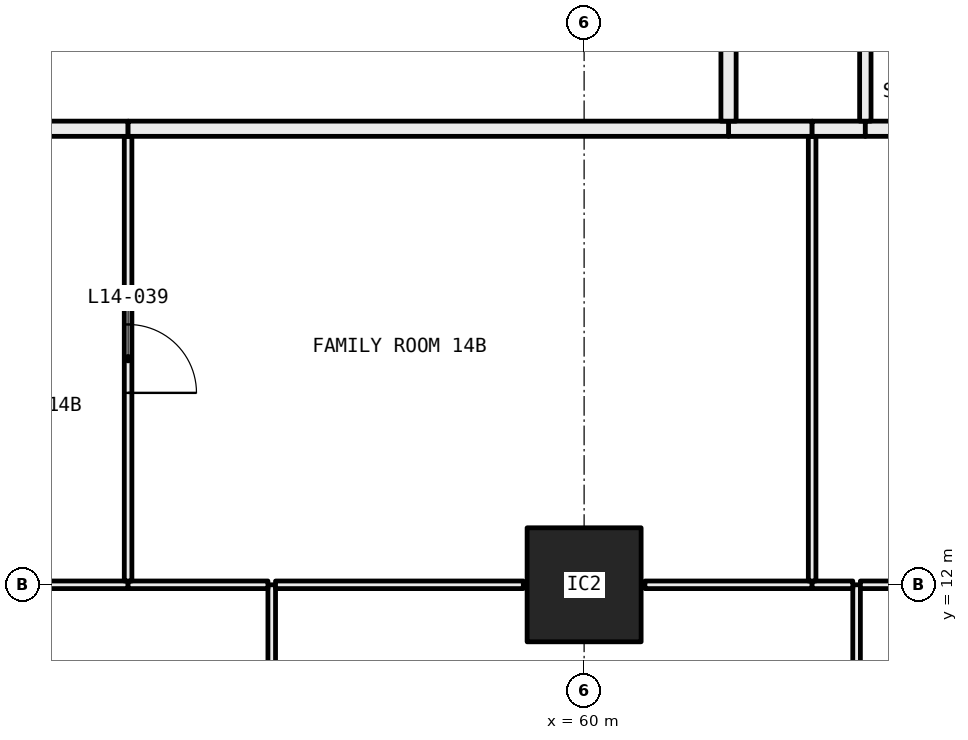
"""IFC4 building model, lengths in metres.
Left out: names, types, materials, properties, quantities, classifications, styles, units other than length and angle.
Written with IfcOpenShell. Run it as: python <this file> out.ifc"""

import sys

from ifc_helpers import new_model, si_unit, direction, frame, frame_2d, origin, origin_2d, place, context, subcontext, project, spatial, rectangle, hollow_rectangle, extrude, element, fill, save


model = new_model("IFC4")
c1 = context("Model", 3, precision=1e-05, world=origin(), true_north=direction((0.0, 1.0)))
c2 = subcontext(c1, "Body", "Model", "MODEL_VIEW")
j1 = project(units=[si_unit("LENGTHUNIT", "METRE"), si_unit("PLANEANGLEUNIT", "RADIAN")], contexts=[c1])
p1 = place(None, origin())
s1 = spatial("IfcSite", under=j1, at=p1, CompositionType="ELEMENT")
p2 = place(p1, origin())
s2 = spatial("IfcBuilding", under=s1, at=p2, CompositionType="ELEMENT")
p3 = place(p2, frame((0.0, 0.0, 61.05)))
s3 = spatial("IfcBuildingStorey", under=s2, at=p3, CompositionType="ELEMENT", Elevation=61.05)
p4 = place(p3, frame((60.0, 12.0, 0.0), z_axis=(0.0, 0.0, 1.0), x_axis=(1.0, 0.0, 0.0)))
e1 = element("IfcColumn", 1, at=p4, inside=s3, PredefinedType="COLUMN", context=c2, shape_type="SweptSolid", body=[
    extrude(hollow_rectangle(XDim=1.5, YDim=1.5, WallThickness=0.065, at=origin_2d()), origin(), (0.0, 0.0, 1.0), 3.05),
])
p5 = place(p3, frame((55.89, 6.05, 0.0), z_axis=(0.0, 0.0, 1.0), x_axis=(0.0, 1.0, 0.0)))
e2 = element("IfcWall", 2, at=p5, inside=s3, PredefinedType="PARTITIONING", context=c2, shape_type="SweptSolid", body=[
    extrude(rectangle(XDim=5.95, YDim=0.1, at=frame_2d((2.975, 0.0))), origin(), (0.0, 0.0, 1.0), 2.45),
])
p6 = place(p5, frame((2.525, 0.0, 0.0)))
e3 = element("IfcOpeningElement", 3, at=p6, cuts=e2, PredefinedType="OPENING", context=c2, shape_type="SweptSolid", body=[
    extrude(rectangle(XDim=0.9, YDim=2.1, at=frame_2d((0.45, 1.05))), frame((0.0, 0.06, 0.0), z_axis=(0.0, -1.0, 0.0), x_axis=(1.0, 0.0, 0.0)), (0.0, 0.0, 1.0), 0.12),
])
p7 = place(p3, frame((54.0, 12.0, 0.0), z_axis=(0.0, 0.0, 1.0), x_axis=(-1.0, 0.0, 0.0)))
e4 = element("IfcWall", 4, at=p7, inside=s3, PredefinedType="PARTITIONING", context=c2, shape_type="SweptSolid", body=[
    extrude(rectangle(XDim=4.5, YDim=0.1, at=frame_2d((2.25, 0.0))), origin(), (0.0, 0.0, 1.0), 2.45),
])
p8 = place(p7, frame((1.8, 0.0, 0.0)))
e5 = element("IfcOpeningElement", 5, at=p8, cuts=e4, PredefinedType="OPENING", context=c2, shape_type="SweptSolid", body=[
    extrude(rectangle(XDim=0.9, YDim=2.1, at=frame_2d((0.45, 1.05))), frame((0.0, 0.06, 0.0), z_axis=(0.0, -1.0, 0.0), x_axis=(1.0, 0.0, 0.0)), (0.0, 0.0, 1.0), 0.12),
])
p9 = place(p3, frame((55.84, 12.0, 0.0), z_axis=(0.0, 0.0, 1.0), x_axis=(-1.0, 0.0, 0.0)))
e6 = element("IfcWall", 6, at=p9, inside=s3, PredefinedType="PARTITIONING", context=c2, shape_type="SweptSolid", body=[
    extrude(rectangle(XDim=1.84, YDim=0.1, at=frame_2d((0.92, 0.0))), origin(), (0.0, 0.0, 1.0), 2.45),
])
p10 = place(p3, frame((63.585, 6.05, 0.0), z_axis=(0.0, 0.0, 1.0), x_axis=(0.0, 1.0, 0.0)))
e7 = element("IfcWall", 7, at=p10, inside=s3, PredefinedType="PARTITIONING", context=c2, shape_type="SweptSolid", body=[
    extrude(rectangle(XDim=5.95, YDim=0.1, at=frame_2d((2.975, 0.0))), origin(), (0.0, 0.0, 1.0), 2.45),
])
p11 = place(p10, frame((2.525, 0.0, 0.0)))
e8 = element("IfcOpeningElement", 8, at=p11, cuts=e7, PredefinedType="OPENING", context=c2, shape_type="SweptSolid", body=[
    extrude(rectangle(XDim=0.9, YDim=2.1, at=frame_2d((0.45, 1.05))), frame((0.0, 0.06, 0.0), z_axis=(0.0, -1.0, 0.0), x_axis=(1.0, 0.0, 0.0)), (0.0, 0.0, 1.0), 0.12),
])
p12 = place(p3, frame((59.2, 12.0, 0.0), z_axis=(0.0, 0.0, 1.0), x_axis=(-1.0, 0.0, 0.0)))
e9 = element("IfcWall", 9, at=p12, inside=s3, PredefinedType="PARTITIONING", context=c2, shape_type="SweptSolid", body=[
    extrude(rectangle(XDim=3.26, YDim=0.1, at=frame_2d((1.63, 0.0))), origin(), (0.0, 0.0, 1.0), 2.45),
])
p13 = place(p3, frame((63.0, 12.0, 0.0), z_axis=(0.0, 0.0, 1.0), x_axis=(-1.0, 0.0, 0.0)))
e10 = element("IfcWall", 10, at=p13, inside=s3, PredefinedType="PARTITIONING", context=c2, shape_type="SweptSolid", body=[
    extrude(rectangle(XDim=2.2, YDim=0.1, at=frame_2d((1.1, 0.0))), origin(), (0.0, 0.0, 1.0), 2.45),
])
p14 = place(p3, frame((63.535, 12.0, 0.0), z_axis=(0.0, 0.0, 1.0), x_axis=(-1.0, 0.0, 0.0)))
e11 = element("IfcWall", 11, at=p14, inside=s3, PredefinedType="PARTITIONING", context=c2, shape_type="SweptSolid", body=[
    extrude(rectangle(XDim=0.535, YDim=0.1, at=frame_2d((0.268, 0.0))), origin(), (0.0, 0.0, 1.0), 2.45),
])
p15 = place(p3, frame((71.28, 12.0, 0.0), z_axis=(0.0, 0.0, 1.0), x_axis=(-1.0, 0.0, 0.0)))
e12 = element("IfcWall", 12, at=p15, inside=s3, PredefinedType="PARTITIONING", context=c2, shape_type="SweptSolid", body=[
    extrude(rectangle(XDim=7.645, YDim=0.1, at=frame_2d((3.823, 0.0))), origin(), (0.0, 0.0, 1.0), 2.45),
])
p16 = place(p15, frame((3.373, 0.0, 0.0)))
e13 = element("IfcOpeningElement", 13, at=p16, cuts=e12, PredefinedType="OPENING", context=c2, shape_type="SweptSolid", body=[
    extrude(rectangle(XDim=0.9, YDim=2.1, at=frame_2d((0.45, 1.05))), frame((0.0, 0.06, 0.0), z_axis=(0.0, -1.0, 0.0), x_axis=(1.0, 0.0, 0.0)), (0.0, 0.0, 1.0), 0.12),
])
p17 = place(p3, frame((54.0, 12.05, 0.0), z_axis=(0.0, 0.0, 1.0), x_axis=(0.0, 1.0, 0.0)))
e14 = element("IfcWall", 14, at=p17, inside=s3, PredefinedType="PARTITIONING", context=c2, shape_type="SweptSolid", body=[
    extrude(rectangle(XDim=5.85, YDim=0.1, at=frame_2d((2.925, 0.0))), origin(), (0.0, 0.0, 1.0), 2.45),
])
p18 = place(p17, frame((2.475, 0.0, 0.0)))
e15 = element("IfcOpeningElement", 15, at=p18, cuts=e14, PredefinedType="OPENING", context=c2, shape_type="SweptSolid", body=[
    extrude(rectangle(XDim=0.9, YDim=2.1, at=frame_2d((0.45, 1.05))), frame((0.0, 0.06, 0.0), z_axis=(0.0, -1.0, 0.0), x_axis=(1.0, 0.0, 0.0)), (0.0, 0.0, 1.0), 0.12),
])
p19 = place(p3, frame((54.0, 18.0, 0.0), z_axis=(0.0, 0.0, 1.0), x_axis=(-1.0, 0.0, 0.0)))
e16 = element("IfcWall", 16, at=p19, inside=s3, PredefinedType="PARTITIONING", context=c2, shape_type="SweptSolid", body=[
    extrude(rectangle(XDim=4.5, YDim=0.2, at=frame_2d((2.25, 0.0))), origin(), (0.0, 0.0, 1.0), 3.05),
])
p20 = place(p19, frame((1.75, 0.0, 0.0)))
e17 = element("IfcOpeningElement", 17, at=p20, cuts=e16, PredefinedType="OPENING", context=c2, shape_type="SweptSolid", body=[
    extrude(rectangle(XDim=1.0, YDim=2.1, at=frame_2d((0.5, 1.05))), frame((0.0, 0.11, 0.0), z_axis=(0.0, -1.0, 0.0), x_axis=(1.0, 0.0, 0.0)), (0.0, 0.0, 1.0), 0.22),
])
p21 = place(p3, frame((63.0, 12.05, 0.0), z_axis=(0.0, 0.0, 1.0), x_axis=(0.0, 1.0, 0.0)))
e18 = element("IfcWall", 18, at=p21, inside=s3, PredefinedType="PARTITIONING", context=c2, shape_type="SweptSolid", body=[
    extrude(rectangle(XDim=5.85, YDim=0.1, at=frame_2d((2.925, 0.0))), origin(), (0.0, 0.0, 1.0), 2.45),
])
p22 = place(p3, frame((63.0, 18.0, 0.0), z_axis=(0.0, 0.0, 1.0), x_axis=(-1.0, 0.0, 0.0)))
e19 = element("IfcWall", 19, at=p22, inside=s3, PredefinedType="PARTITIONING", context=c2, shape_type="SweptSolid", body=[
    extrude(rectangle(XDim=1.1, YDim=0.2, at=frame_2d((0.55, 0.0))), origin(), (0.0, 0.0, 1.0), 3.05),
])
p23 = place(p3, frame((61.9, 18.0, 0.0), z_axis=(0.0, 0.0, 1.0), x_axis=(-1.0, 0.0, 0.0)))
e20 = element("IfcWall", 20, at=p23, inside=s3, PredefinedType="PARTITIONING", context=c2, shape_type="SweptSolid", body=[
    extrude(rectangle(XDim=7.9, YDim=0.2, at=frame_2d((3.95, 0.0))), origin(), (0.0, 0.0, 1.0), 3.05),
])
p24 = place(p3, frame((63.7, 18.0, 0.0), z_axis=(0.0, 0.0, 1.0), x_axis=(-1.0, 0.0, 0.0)))
e21 = element("IfcWall", 21, at=p24, inside=s3, PredefinedType="PARTITIONING", context=c2, shape_type="SweptSolid", body=[
    extrude(rectangle(XDim=0.7, YDim=0.2, at=frame_2d((0.35, 0.0))), origin(), (0.0, 0.0, 1.0), 3.05),
])
p25 = place(p3, frame((66.0, 18.0, 0.0), z_axis=(0.0, 0.0, 1.0), x_axis=(-1.0, 0.0, 0.0)))
e22 = element("IfcWall", 22, at=p25, inside=s3, PredefinedType="PARTITIONING", context=c2, shape_type="SweptSolid", body=[
    extrude(rectangle(XDim=2.3, YDim=0.2, at=frame_2d((1.15, 0.0))), origin(), (0.0, 0.0, 1.0), 3.05),
])
p26 = place(p3, frame((63.7, 18.1, 0.0), z_axis=(0.0, 0.0, 1.0), x_axis=(0.0, 1.0, 0.0)))
e23 = element("IfcWall", 23, at=p26, inside=s3, PredefinedType="PARTITIONING", context=c2, shape_type="SweptSolid", body=[
    extrude(rectangle(XDim=2.9, YDim=0.15, at=frame_2d((1.45, 0.0))), origin(), (0.0, 0.0, 1.0), 3.05),
])
p27 = place(p3, frame((61.9, 21.0, 0.0), z_axis=(0.0, 0.0, 1.0), x_axis=(0.0, -1.0, 0.0)))
e24 = element("IfcWall", 24, at=p27, inside=s3, PredefinedType="PARTITIONING", context=c2, shape_type="SweptSolid", body=[
    extrude(rectangle(XDim=2.9, YDim=0.2, at=frame_2d((1.45, 0.0))), origin(), (0.0, 0.0, 1.0), 3.05),
])
p28 = place(p18, frame((0.9, 0.0, 0.0), x_axis=(-1.0, 0.0, 0.0)))
e25 = element("IfcDoor", 25, at=p28, inside=s3, OperationType="SINGLE_SWING_LEFT", PredefinedType="DOOR", context=c2, shape_type="SweptSolid", body=[
    extrude(rectangle(XDim=0.9, YDim=2.1, at=frame_2d((0.45, 1.05))), frame((0.0, 0.025, 0.0), z_axis=(0.0, -1.0, 0.0), x_axis=(1.0, 0.0, 0.0)), (0.0, 0.0, 1.0), 0.05),
])
fill(e15, e25)
save(model, sys.argv[1])
